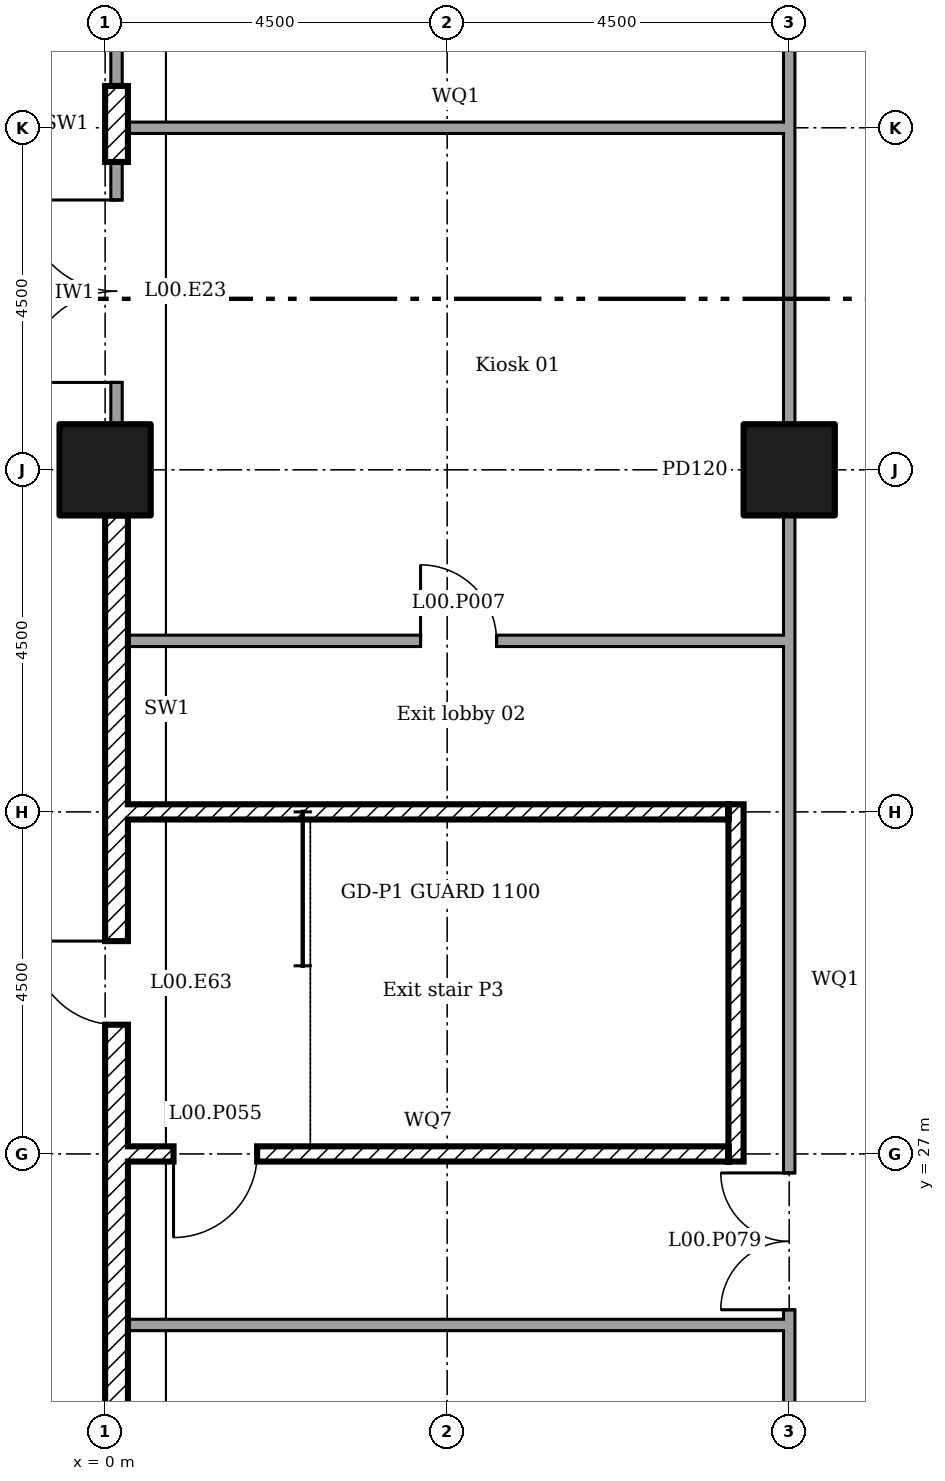
"""IFC4 building model, lengths in metres.
Left out: names, types, materials, properties, quantities, classifications, styles, units other than length and angle.
Written with IfcOpenShell. Run it as: python <this file> out.ifc"""

import sys

from ifc_helpers import new_model, si_unit, direction, frame, frame_2d, origin, origin_2d, place, context, subcontext, project, spatial, rectangle, extrude, element, fill, save


model = new_model("IFC4")
c1 = context("Model", 3, precision=1e-05, world=origin(), true_north=direction((0.0, 1.0)))
c2 = subcontext(c1, "Body", "Model", "MODEL_VIEW")
j1 = project(units=[si_unit("LENGTHUNIT", "METRE"), si_unit("PLANEANGLEUNIT", "RADIAN")], contexts=[c1])
p1 = place(None, origin())
s1 = spatial("IfcSite", under=j1, at=p1, CompositionType="ELEMENT")
p2 = place(p1, origin())
s2 = spatial("IfcBuilding", under=s1, at=p2, CompositionType="ELEMENT")
p3 = place(p2, origin())
s3 = spatial("IfcBuildingStorey", under=s2, at=p3, CompositionType="ELEMENT", Elevation=0.0)
for number, where in (
    (1, (0.0, 36.0, 0.0)),
    (2, (9.0, 36.0, 0.0)),
):
    element("IfcColumn", number, at=place(p3, frame(where)), inside=s3, PredefinedType="COLUMN", context=c2, shape_type="SweptSolid", body=[
        extrude(rectangle(XDim=1.2, YDim=1.2, at=origin_2d()), origin(), (0.0, 0.0, 1.0), 6.0),
    ])
p4 = place(p3, frame((0.15, 44.45, 0.0), z_axis=(0.0, 0.0, 1.0), x_axis=(0.0, -1.0, 0.0)))
e3 = element("IfcWall", 3, at=p4, inside=s3, PredefinedType="SOLIDWALL", context=c2, shape_type="SweptSolid", body=[
    extrude(rectangle(XDim=3.4, YDim=0.15, at=frame_2d((1.7, 0.0))), origin(), (0.0, 0.0, 1.0), 5.55),
])
p5 = place(p4, frame((0.5, 0.0, 0.0)))
e4 = element("IfcOpeningElement", 4, at=p5, cuts=e3, PredefinedType="OPENING", context=c2, shape_type="SweptSolid", body=[
    extrude(rectangle(XDim=2.4, YDim=2.7, at=frame_2d((1.2, 1.35))), frame((0.0, 0.085, 0.0), z_axis=(0.0, -1.0, 0.0), x_axis=(1.0, 0.0, 0.0)), (0.0, 0.0, 1.0), 0.17),
])
p6 = place(p3, frame((0.15, 41.05, 0.0), z_axis=(0.0, 0.0, 1.0), x_axis=(0.0, -1.0, 0.0)))
e5 = element("IfcWall", 5, at=p6, inside=s3, PredefinedType="ELEMENTEDWALL", context=c2, shape_type="SweptSolid", body=[
    extrude(rectangle(XDim=1.0, YDim=0.3, at=frame_2d((0.5, 0.0))), origin(), (0.0, 0.0, 1.0), 5.55),
])
p7 = place(p3, frame((0.15, 40.05, 0.0), z_axis=(0.0, 0.0, 1.0), x_axis=(0.0, -1.0, 0.0)))
e6 = element("IfcWall", 6, at=p7, inside=s3, PredefinedType="SOLIDWALL", context=c2, shape_type="SweptSolid", body=[
    extrude(rectangle(XDim=3.45, YDim=0.15, at=frame_2d((1.725, 0.0))), origin(), (0.0, 0.0, 1.0), 5.55),
])
p8 = place(p7, frame((0.5, 0.0, 0.0)))
e7 = element("IfcOpeningElement", 7, at=p8, cuts=e6, PredefinedType="OPENING", context=c2, shape_type="SweptSolid", body=[
    extrude(rectangle(XDim=2.4, YDim=2.7, at=frame_2d((1.2, 1.35))), frame((0.0, 0.085, 0.0), z_axis=(0.0, -1.0, 0.0), x_axis=(1.0, 0.0, 0.0)), (0.0, 0.0, 1.0), 0.17),
])
p9 = place(p3, frame((0.15, 35.4, 0.0), z_axis=(0.0, 0.0, 1.0), x_axis=(0.0, -1.0, 0.0)))
e8 = element("IfcWall", 8, at=p9, inside=s3, PredefinedType="ELEMENTEDWALL", context=c2, shape_type="SweptSolid", body=[
    extrude(rectangle(XDim=5.1, YDim=0.3, at=frame_2d((2.55, 0.0))), origin(), (0.0, 0.0, 1.0), 5.55),
])
p10 = place(p3, frame((0.15, 30.3, 0.0), z_axis=(0.0, 0.0, 1.0), x_axis=(0.0, -1.0, 0.0)))
e9 = element("IfcWall", 9, at=p10, inside=s3, PredefinedType="ELEMENTEDWALL", context=c2, shape_type="SweptSolid", body=[
    extrude(rectangle(XDim=2.1, YDim=0.3, at=frame_2d((1.05, 0.0))), origin(), (0.0, 0.0, 1.0), 5.55),
])
p11 = place(p10, frame((0.5, 0.0, 0.0)))
e10 = element("IfcOpeningElement", 10, at=p11, cuts=e9, PredefinedType="OPENING", context=c2, shape_type="SweptSolid", body=[
    extrude(rectangle(XDim=1.1, YDim=2.4, at=frame_2d((0.55, 1.2))), frame((0.0, 0.16, 0.0), z_axis=(0.0, -1.0, 0.0), x_axis=(1.0, 0.0, 0.0)), (0.0, 0.0, 1.0), 0.32),
])
p12 = place(p3, frame((0.15, 28.2, 0.0), z_axis=(0.0, 0.0, 1.0), x_axis=(0.0, -1.0, 0.0)))
e11 = element("IfcWall", 11, at=p12, inside=s3, PredefinedType="ELEMENTEDWALL", context=c2, shape_type="SweptSolid", body=[
    extrude(rectangle(XDim=5.1, YDim=0.3, at=frame_2d((2.55, 0.0))), origin(), (0.0, 0.0, 1.0), 5.55),
])
p13 = place(p3, frame((9.0, 23.095, 0.0), z_axis=(0.0, 0.0, 1.0), x_axis=(0.0, 1.0, 0.0)))
e12 = element("IfcWall", 12, at=p13, inside=s3, PredefinedType="PARTITIONING", context=c2, shape_type="SweptSolid", body=[
    extrude(rectangle(XDim=1.73, YDim=0.15, at=frame_2d((0.865, 0.0))), origin(), (0.0, 0.0, 1.0), 5.55),
])
p14 = place(p3, frame((9.0, 24.75, 0.0), z_axis=(0.0, 0.0, 1.0), x_axis=(0.0, 1.0, 0.0)))
e13 = element("IfcWall", 13, at=p14, inside=s3, PredefinedType="PARTITIONING", context=c2, shape_type="SweptSolid", body=[
    extrude(rectangle(XDim=9.075, YDim=0.15, at=frame_2d((4.538, 0.0))), origin(), (0.0, 0.0, 1.0), 5.55),
])
p15 = place(p14, frame((0.2, 0.0, 0.0)))
e14 = element("IfcOpeningElement", 14, at=p15, cuts=e13, PredefinedType="OPENING", context=c2, shape_type="SweptSolid", body=[
    extrude(rectangle(XDim=1.8, YDim=2.1, at=frame_2d((0.9, 1.05))), frame((0.0, 0.085, 0.0), z_axis=(0.0, -1.0, 0.0), x_axis=(1.0, 0.0, 0.0)), (0.0, 0.0, 1.0), 0.17),
])
p16 = place(p3, frame((9.0, 33.75, 0.0), z_axis=(0.0, 0.0, 1.0), x_axis=(0.0, 1.0, 0.0)))
e15 = element("IfcWall", 15, at=p16, inside=s3, PredefinedType="PARTITIONING", context=c2, shape_type="SweptSolid", body=[
    extrude(rectangle(XDim=1.655, YDim=0.15, at=frame_2d((0.828, 0.0))), origin(), (0.0, 0.0, 1.0), 5.55),
])
p17 = place(p3, frame((9.0, 36.595, 0.0), z_axis=(0.0, 0.0, 1.0), x_axis=(0.0, 1.0, 0.0)))
e16 = element("IfcWall", 16, at=p17, inside=s3, PredefinedType="PARTITIONING", context=c2, shape_type="SweptSolid", body=[
    extrude(rectangle(XDim=3.98, YDim=0.15, at=frame_2d((1.99, 0.0))), origin(), (0.0, 0.0, 1.0), 5.55),
])
p18 = place(p3, frame((9.0, 40.5, 0.0), z_axis=(0.0, 0.0, 1.0), x_axis=(0.0, 1.0, 0.0)))
e17 = element("IfcWall", 17, at=p18, inside=s3, PredefinedType="PARTITIONING", context=c2, shape_type="SweptSolid", body=[
    extrude(rectangle(XDim=8.405, YDim=0.15, at=frame_2d((4.203, 0.0))), origin(), (0.0, 0.0, 1.0), 5.55),
])
p19 = place(p18, frame((3.3, 0.0, 0.0)))
e18 = element("IfcOpeningElement", 18, at=p19, cuts=e17, PredefinedType="OPENING", context=c2, shape_type="SweptSolid", body=[
    extrude(rectangle(XDim=1.8, YDim=2.1, at=frame_2d((0.9, 1.05))), frame((0.0, 0.085, 0.0), z_axis=(0.0, -1.0, 0.0), x_axis=(1.0, 0.0, 0.0)), (0.0, 0.0, 1.0), 0.17),
])
p20 = place(p3, frame((0.3, 24.75, 0.0)))
e19 = element("IfcWall", 19, at=p20, inside=s3, PredefinedType="PARTITIONING", context=c2, shape_type="SweptSolid", body=[
    extrude(rectangle(XDim=8.625, YDim=0.15, at=frame_2d((4.312, 0.0))), origin(), (0.0, 0.0, 1.0), 5.55),
])
p21 = place(p3, frame((0.3, 33.75, 0.0)))
e20 = element("IfcWall", 20, at=p21, inside=s3, PredefinedType="PARTITIONING", context=c2, shape_type="SweptSolid", body=[
    extrude(rectangle(XDim=8.625, YDim=0.15, at=frame_2d((4.312, 0.0))), origin(), (0.0, 0.0, 1.0), 5.55),
])
p22 = place(p21, frame((3.85, 0.0, 0.0)))
e21 = element("IfcOpeningElement", 21, at=p22, cuts=e20, PredefinedType="OPENING", context=c2, shape_type="SweptSolid", body=[
    extrude(rectangle(XDim=1.0, YDim=2.1, at=frame_2d((0.5, 1.05))), frame((0.0, 0.085, 0.0), z_axis=(0.0, -1.0, 0.0), x_axis=(1.0, 0.0, 0.0)), (0.0, 0.0, 1.0), 0.17),
])
p23 = place(p3, frame((8.3, 26.9, 0.0), z_axis=(0.0, 0.0, 1.0), x_axis=(0.0, 1.0, 0.0)))
e22 = element("IfcWall", 22, at=p23, inside=s3, PredefinedType="SOLIDWALL", context=c2, shape_type="SweptSolid", body=[
    extrude(rectangle(XDim=4.7, YDim=0.2, at=frame_2d((2.35, 0.0))), origin(), (0.0, 0.0, 1.0), 5.55),
])
p24 = place(p3, frame((0.3, 27.0, 0.0)))
e23 = element("IfcWall", 23, at=p24, inside=s3, PredefinedType="SOLIDWALL", context=c2, shape_type="SweptSolid", body=[
    extrude(rectangle(XDim=7.9, YDim=0.2, at=frame_2d((3.95, 0.0))), origin(), (0.0, 0.0, 1.0), 5.55),
])
p25 = place(p24, frame((0.6, 0.0, 0.0)))
e24 = element("IfcOpeningElement", 24, at=p25, cuts=e23, PredefinedType="OPENING", context=c2, shape_type="SweptSolid", body=[
    extrude(rectangle(XDim=1.1, YDim=2.1, at=frame_2d((0.55, 1.05))), frame((0.0, 0.11, 0.0), z_axis=(0.0, -1.0, 0.0), x_axis=(1.0, 0.0, 0.0)), (0.0, 0.0, 1.0), 0.22),
])
p26 = place(p3, frame((0.3, 31.5, 0.0)))
e25 = element("IfcWall", 25, at=p26, inside=s3, PredefinedType="SOLIDWALL", context=c2, shape_type="SweptSolid", body=[
    extrude(rectangle(XDim=7.9, YDim=0.2, at=frame_2d((3.95, 0.0))), origin(), (0.0, 0.0, 1.0), 5.55),
])
p27 = place(p3, frame((0.3, 40.5, 0.0)))
e26 = element("IfcWall", 26, at=p27, inside=s3, PredefinedType="PARTITIONING", context=c2, shape_type="SweptSolid", body=[
    extrude(rectangle(XDim=8.625, YDim=0.15, at=frame_2d((4.312, 0.0))), origin(), (0.0, 0.0, 1.0), 5.55),
])
p28 = place(p8, frame((2.4, 0.0, 0.0), x_axis=(-1.0, 0.0, 0.0)))
e27 = element("IfcDoor", 27, at=p28, inside=s3, OperationType="DOUBLE_DOOR_DOUBLE_SWING", PredefinedType="NOTDEFINED", context=c2, shape_type="SweptSolid", body=[
    extrude(rectangle(XDim=2.4, YDim=2.7, at=frame_2d((1.2, 1.35))), frame((0.0, 0.025, 0.0), z_axis=(0.0, -1.0, 0.0), x_axis=(1.0, 0.0, 0.0)), (0.0, 0.0, 1.0), 0.05),
])
fill(e7, e27)
p29 = place(p11, frame((1.1, 0.0, 0.0), x_axis=(-1.0, 0.0, 0.0)))
e28 = element("IfcDoor", 28, at=p29, inside=s3, OperationType="SINGLE_SWING_LEFT", PredefinedType="NOTDEFINED", context=c2, shape_type="SweptSolid", body=[
    extrude(rectangle(XDim=1.1, YDim=2.4, at=frame_2d((0.55, 1.2))), frame((0.0, 0.025, 0.0), z_axis=(0.0, -1.0, 0.0), x_axis=(1.0, 0.0, 0.0)), (0.0, 0.0, 1.0), 0.05),
])
fill(e10, e28)
p30 = place(p22, origin())
e29 = element("IfcDoor", 29, at=p30, inside=s3, OperationType="SINGLE_SWING_RIGHT", PredefinedType="DOOR", context=c2, shape_type="SweptSolid", body=[
    extrude(rectangle(XDim=1.0, YDim=2.1, at=frame_2d((0.5, 1.05))), frame((0.0, 0.025, 0.0), z_axis=(0.0, -1.0, 0.0), x_axis=(1.0, 0.0, 0.0)), (0.0, 0.0, 1.0), 0.05),
])
fill(e21, e29)
p31 = place(p25, frame((1.1, 0.0, 0.0), x_axis=(-1.0, 0.0, 0.0)))
e30 = element("IfcDoor", 30, at=p31, inside=s3, OperationType="SINGLE_SWING_LEFT", PredefinedType="DOOR", context=c2, shape_type="SweptSolid", body=[
    extrude(rectangle(XDim=1.1, YDim=2.1, at=frame_2d((0.55, 1.05))), frame((0.0, 0.025, 0.0), z_axis=(0.0, -1.0, 0.0), x_axis=(1.0, 0.0, 0.0)), (0.0, 0.0, 1.0), 0.05),
])
fill(e24, e30)
p32 = place(p15, origin())
e31 = element("IfcDoor", 31, at=p32, inside=s3, OperationType="DOUBLE_DOOR_SINGLE_SWING", PredefinedType="DOOR", context=c2, shape_type="SweptSolid", body=[
    extrude(rectangle(XDim=1.8, YDim=2.1, at=frame_2d((0.9, 1.05))), frame((0.0, 0.025, 0.0), z_axis=(0.0, -1.0, 0.0), x_axis=(1.0, 0.0, 0.0)), (0.0, 0.0, 1.0), 0.05),
])
fill(e14, e31)
save(model, sys.argv[1])
